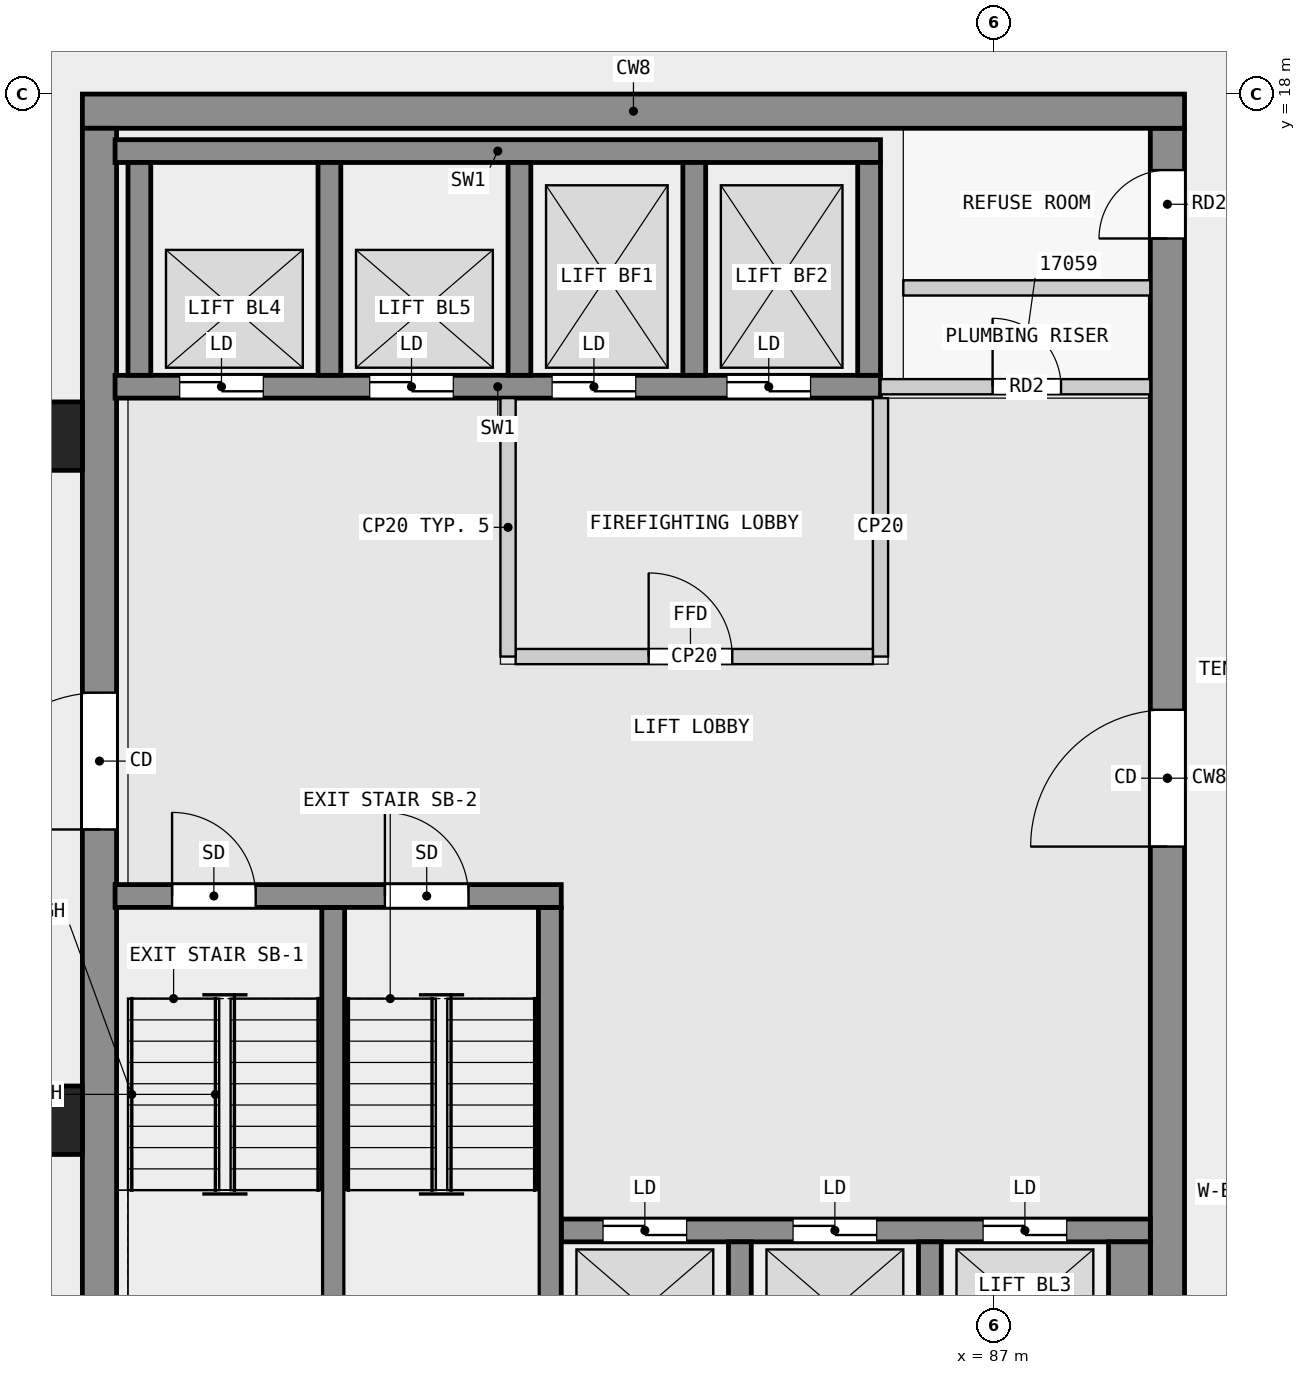
"""IFC4 building model, lengths in metres.
Left out: names, types, materials, properties, quantities, classifications, styles, units other than length and angle.
Written with IfcOpenShell. Run it as: python <this file> out.ifc"""

import sys

from ifc_helpers import new_model, si_unit, direction, frame, frame_2d, origin, origin_2d, place, context, subcontext, project, spatial, rectangle, extrude, element, fill, save


model = new_model("IFC4")
c1 = context("Model", 3, precision=1e-05, world=origin(), true_north=direction((0.0, 1.0)))
c2 = subcontext(c1, "Body", "Model", "MODEL_VIEW")
j1 = project(units=[si_unit("LENGTHUNIT", "METRE"), si_unit("PLANEANGLEUNIT", "RADIAN")], contexts=[c1])
p1 = place(None, origin())
s1 = spatial("IfcSite", under=j1, at=p1, CompositionType="ELEMENT")
p2 = place(p1, origin())
s2 = spatial("IfcBuilding", under=s1, at=p2, CompositionType="ELEMENT")
p3 = place(p2, frame((0.0, 0.0, 68.8)))
s3 = spatial("IfcBuildingStorey", under=s2, at=p3, CompositionType="ELEMENT", Elevation=68.8)
for number, where, z_axis, x_axis in (
    (1, (74.55, 13.5, 0.0), (0.0, 0.0, 1.0), (1.0, 0.0, 0.0)),
    (2, (74.55, 4.5, 0.0), (0.0, 0.0, 1.0), (1.0, 0.0, 0.0)),
):
    element("IfcColumn", number, at=place(p3, frame(where, z_axis=z_axis, x_axis=x_axis)), inside=s3, PredefinedType="COLUMN", context=c2, shape_type="SweptSolid", body=[
        extrude(rectangle(XDim=0.9, YDim=0.9, at=origin_2d()), origin(), (0.0, 0.0, 1.0), 3.5),
    ])
p4 = place(p3, frame((75.0, 17.775, 0.0), z_axis=(0.0, 0.0, 1.0), x_axis=(1.0, 0.0, 0.0)))
e3 = element("IfcWall", 3, at=p4, inside=s3, PredefinedType="SHEAR", context=c2, shape_type="SweptSolid", body=[
    extrude(rectangle(XDim=14.5, YDim=0.45, at=frame_2d((7.25, 0.0))), origin(), (0.0, 0.0, 1.0), 3.2),
])
p5 = place(p3, frame((75.225, 0.45, 0.0), z_axis=(0.0, 0.0, 1.0), x_axis=(0.0, 1.0, 0.0)))
e4 = element("IfcWall", 4, at=p5, inside=s3, PredefinedType="SHEAR", context=c2, shape_type="SweptSolid", body=[
    extrude(rectangle(XDim=17.1, YDim=0.45, at=frame_2d((8.55, 0.0))), origin(), (0.0, 0.0, 1.0), 3.2),
])
p6 = place(p5, frame((7.875, 0.0, 0.0)))
e5 = element("IfcOpeningElement", 5, at=p6, cuts=e4, PredefinedType="OPENING", context=c2, shape_type="SweptSolid", body=[
    extrude(rectangle(XDim=1.8, YDim=2.1, at=frame_2d((0.9, 1.05))), frame((0.0, 0.235, 0.0), z_axis=(0.0, -1.0, 0.0), x_axis=(1.0, 0.0, 0.0)), (0.0, 0.0, 1.0), 0.47),
])
p7 = place(p3, frame((89.275, 0.45, 0.0), z_axis=(0.0, 0.0, 1.0), x_axis=(0.0, 1.0, 0.0)))
e6 = element("IfcWall", 6, at=p7, inside=s3, PredefinedType="SHEAR", context=c2, shape_type="SweptSolid", body=[
    extrude(rectangle(XDim=17.1, YDim=0.45, at=frame_2d((8.55, 0.0))), origin(), (0.0, 0.0, 1.0), 3.2),
])
p8 = place(p7, frame((7.65, 0.0, 0.0)))
e7 = element("IfcOpeningElement", 7, at=p8, cuts=e6, PredefinedType="OPENING", context=c2, shape_type="SweptSolid", body=[
    extrude(rectangle(XDim=1.8, YDim=2.1, at=frame_2d((0.9, 1.05))), frame((0.0, 0.235, 0.0), z_axis=(0.0, -1.0, 0.0), x_axis=(1.0, 0.0, 0.0)), (0.0, 0.0, 1.0), 0.47),
])
p9 = place(p7, frame((15.65, 0.0, 0.0)))
e8 = element("IfcOpeningElement", 8, at=p9, cuts=e6, PredefinedType="OPENING", context=c2, shape_type="SweptSolid", body=[
    extrude(rectangle(XDim=0.9, YDim=2.1, at=frame_2d((0.45, 1.05))), frame((0.0, 0.235, 0.0), z_axis=(0.0, -1.0, 0.0), x_axis=(1.0, 0.0, 0.0)), (0.0, 0.0, 1.0), 0.47),
])
p10 = place(p3, frame((75.43, 7.45, 0.0), z_axis=(0.0, 0.0, 1.0), x_axis=(1.0, 0.0, 0.0)))
e9 = element("IfcWall", 9, at=p10, inside=s3, PredefinedType="SHEAR", context=c2, shape_type="SweptSolid", body=[
    extrude(rectangle(XDim=5.87, YDim=0.3, at=frame_2d((2.935, 0.0))), origin(), (0.0, 0.0, 1.0), 3.2),
])
p11 = place(p10, frame((0.75, 0.0, 0.0)))
e10 = element("IfcOpeningElement", 10, at=p11, cuts=e9, PredefinedType="OPENING", context=c2, shape_type="SweptSolid", body=[
    extrude(rectangle(XDim=1.1, YDim=2.1, at=frame_2d((0.55, 1.05))), frame((0.0, 0.16, 0.0), z_axis=(0.0, -1.0, 0.0), x_axis=(1.0, 0.0, 0.0)), (0.0, 0.0, 1.0), 0.32),
])
p12 = place(p10, frame((3.55, 0.0, 0.0)))
e11 = element("IfcOpeningElement", 11, at=p12, cuts=e9, PredefinedType="OPENING", context=c2, shape_type="SweptSolid", body=[
    extrude(rectangle(XDim=1.1, YDim=2.1, at=frame_2d((0.55, 1.05))), frame((0.0, 0.16, 0.0), z_axis=(0.0, -1.0, 0.0), x_axis=(1.0, 0.0, 0.0)), (0.0, 0.0, 1.0), 0.32),
])
for number, where, z_axis, x_axis in (
    (12, (78.3, 0.9, 0.0), (0.0, 0.0, 1.0), (0.0, 1.0, 0.0)),
    (13, (81.15, 0.9, 0.0), (0.0, 0.0, 1.0), (0.0, 1.0, 0.0)),
):
    element("IfcWall", number, at=place(p3, frame(where, z_axis=z_axis, x_axis=x_axis)), inside=s3, PredefinedType="SHEAR", context=c2, shape_type="SweptSolid", body=[
        extrude(rectangle(XDim=6.4, YDim=0.3, at=frame_2d((3.2, 0.0))), origin(), (0.0, 0.0, 1.0), 3.2),
    ])
for number, where, z_axis, x_axis in (
    (14, (83.65, 0.9, 0.0), (0.0, 0.0, 1.0), (0.0, 1.0, 0.0)),
    (15, (86.15, 0.9, 0.0), (0.0, 0.0, 1.0), (0.0, 1.0, 0.0)),
):
    element("IfcWall", number, at=place(p3, frame(where, z_axis=z_axis, x_axis=x_axis)), inside=s3, PredefinedType="SHEAR", context=c2, shape_type="SweptSolid", body=[
        extrude(rectangle(XDim=2.0, YDim=0.3, at=frame_2d((1.0, 0.0))), origin(), (0.0, 0.0, 1.0), 3.2),
    ])
p13 = place(p3, frame((88.775, 0.9, 0.0), z_axis=(0.0, 0.0, 1.0), x_axis=(0.0, 1.0, 0.0)))
e16 = element("IfcWall", 16, at=p13, inside=s3, PredefinedType="SHEAR", context=c2, shape_type="SweptSolid", body=[
    extrude(rectangle(XDim=2.0, YDim=0.55, at=frame_2d((1.0, 0.0))), origin(), (0.0, 0.0, 1.0), 3.2),
])
p14 = place(p3, frame((81.3, 3.05, 0.0), z_axis=(0.0, 0.0, 1.0), x_axis=(1.0, 0.0, 0.0)))
e17 = element("IfcWall", 17, at=p14, inside=s3, PredefinedType="SHEAR", context=c2, shape_type="SweptSolid", body=[
    extrude(rectangle(XDim=7.75, YDim=0.3, at=frame_2d((3.875, 0.0))), origin(), (0.0, 0.0, 1.0), 3.2),
])
p15 = place(p14, frame((0.55, 0.0, 0.0)))
e18 = element("IfcOpeningElement", 18, at=p15, cuts=e17, PredefinedType="OPENING", context=c2, shape_type="SweptSolid", body=[
    extrude(rectangle(XDim=1.1, YDim=2.1, at=frame_2d((0.55, 1.05))), frame((0.0, 0.16, 0.0), z_axis=(0.0, -1.0, 0.0), x_axis=(1.0, 0.0, 0.0)), (0.0, 0.0, 1.0), 0.32),
])
p16 = place(p14, frame((3.05, 0.0, 0.0)))
e19 = element("IfcOpeningElement", 19, at=p16, cuts=e17, PredefinedType="OPENING", context=c2, shape_type="SweptSolid", body=[
    extrude(rectangle(XDim=1.1, YDim=2.1, at=frame_2d((0.55, 1.05))), frame((0.0, 0.16, 0.0), z_axis=(0.0, -1.0, 0.0), x_axis=(1.0, 0.0, 0.0)), (0.0, 0.0, 1.0), 0.32),
])
p17 = place(p14, frame((5.55, 0.0, 0.0)))
e20 = element("IfcOpeningElement", 20, at=p17, cuts=e17, PredefinedType="OPENING", context=c2, shape_type="SweptSolid", body=[
    extrude(rectangle(XDim=1.1, YDim=2.1, at=frame_2d((0.55, 1.05))), frame((0.0, 0.16, 0.0), z_axis=(0.0, -1.0, 0.0), x_axis=(1.0, 0.0, 0.0)), (0.0, 0.0, 1.0), 0.32),
])
p18 = place(p3, frame((75.43, 17.25, 0.0), z_axis=(0.0, 0.0, 1.0), x_axis=(1.0, 0.0, 0.0)))
e21 = element("IfcWall", 21, at=p18, inside=s3, PredefinedType="SHEAR", context=c2, shape_type="SweptSolid", body=[
    extrude(rectangle(XDim=10.07, YDim=0.3, at=frame_2d((5.035, 0.0))), origin(), (0.0, 0.0, 1.0), 3.2),
])
p19 = place(p3, frame((75.43, 14.15, 0.0), z_axis=(0.0, 0.0, 1.0), x_axis=(1.0, 0.0, 0.0)))
e22 = element("IfcWall", 22, at=p19, inside=s3, PredefinedType="SHEAR", context=c2, shape_type="SweptSolid", body=[
    extrude(rectangle(XDim=10.07, YDim=0.3, at=frame_2d((5.035, 0.0))), origin(), (0.0, 0.0, 1.0), 3.2),
])
p20 = place(p19, frame((0.85, 0.0, 0.0)))
e23 = element("IfcOpeningElement", 23, at=p20, cuts=e22, PredefinedType="OPENING", context=c2, shape_type="SweptSolid", body=[
    extrude(rectangle(XDim=1.1, YDim=2.1, at=frame_2d((0.55, 1.05))), frame((0.0, 0.16, 0.0), z_axis=(0.0, -1.0, 0.0), x_axis=(1.0, 0.0, 0.0)), (0.0, 0.0, 1.0), 0.32),
])
p21 = place(p19, frame((3.35, 0.0, 0.0)))
e24 = element("IfcOpeningElement", 24, at=p21, cuts=e22, PredefinedType="OPENING", context=c2, shape_type="SweptSolid", body=[
    extrude(rectangle(XDim=1.1, YDim=2.1, at=frame_2d((0.55, 1.05))), frame((0.0, 0.16, 0.0), z_axis=(0.0, -1.0, 0.0), x_axis=(1.0, 0.0, 0.0)), (0.0, 0.0, 1.0), 0.32),
])
p22 = place(p19, frame((5.75, 0.0, 0.0)))
e25 = element("IfcOpeningElement", 25, at=p22, cuts=e22, PredefinedType="OPENING", context=c2, shape_type="SweptSolid", body=[
    extrude(rectangle(XDim=1.1, YDim=2.1, at=frame_2d((0.55, 1.05))), frame((0.0, 0.16, 0.0), z_axis=(0.0, -1.0, 0.0), x_axis=(1.0, 0.0, 0.0)), (0.0, 0.0, 1.0), 0.32),
])
p23 = place(p19, frame((8.05, 0.0, 0.0)))
e26 = element("IfcOpeningElement", 26, at=p23, cuts=e22, PredefinedType="OPENING", context=c2, shape_type="SweptSolid", body=[
    extrude(rectangle(XDim=1.1, YDim=2.1, at=frame_2d((0.55, 1.05))), frame((0.0, 0.16, 0.0), z_axis=(0.0, -1.0, 0.0), x_axis=(1.0, 0.0, 0.0)), (0.0, 0.0, 1.0), 0.32),
])
for number, where, z_axis, x_axis in (
    (27, (75.75, 14.3, 0.0), (0.0, 0.0, 1.0), (0.0, 1.0, 0.0)),
    (28, (78.25, 14.3, 0.0), (0.0, 0.0, 1.0), (0.0, 1.0, 0.0)),
    (29, (80.75, 14.3, 0.0), (0.0, 0.0, 1.0), (0.0, 1.0, 0.0)),
    (30, (83.05, 14.3, 0.0), (0.0, 0.0, 1.0), (0.0, 1.0, 0.0)),
    (31, (85.35, 14.3, 0.0), (0.0, 0.0, 1.0), (0.0, 1.0, 0.0)),
):
    element("IfcWall", number, at=place(p3, frame(where, z_axis=z_axis, x_axis=x_axis)), inside=s3, PredefinedType="SHEAR", context=c2, shape_type="SweptSolid", body=[
        extrude(rectangle(XDim=2.8, YDim=0.3, at=frame_2d((1.4, 0.0))), origin(), (0.0, 0.0, 1.0), 3.2),
    ])
p24 = place(p3, frame((80.6, 10.6, 0.0), z_axis=(0.0, 0.0, 1.0), x_axis=(0.0, 1.0, 0.0)))
e32 = element("IfcWall", 32, at=p24, inside=s3, PredefinedType="PARTITIONING", context=c2, shape_type="SweptSolid", body=[
    extrude(rectangle(XDim=3.4, YDim=0.2, at=frame_2d((1.7, 0.0))), origin(), (0.0, 0.0, 1.0), 3.2),
])
p25 = place(p3, frame((80.7, 10.6, 0.0), z_axis=(0.0, 0.0, 1.0), x_axis=(1.0, 0.0, 0.0)))
e33 = element("IfcWall", 33, at=p25, inside=s3, PredefinedType="PARTITIONING", context=c2, shape_type="SweptSolid", body=[
    extrude(rectangle(XDim=4.7, YDim=0.2, at=frame_2d((2.35, 0.0))), origin(), (0.0, 0.0, 1.0), 3.2),
])
p26 = place(p25, frame((1.75, 0.0, 0.0)))
e34 = element("IfcOpeningElement", 34, at=p26, cuts=e33, PredefinedType="OPENING", context=c2, shape_type="SweptSolid", body=[
    extrude(rectangle(XDim=1.1, YDim=2.1, at=frame_2d((0.55, 1.05))), frame((0.0, 0.11, 0.0), z_axis=(0.0, -1.0, 0.0), x_axis=(1.0, 0.0, 0.0)), (0.0, 0.0, 1.0), 0.22),
])
p27 = place(p3, frame((85.5, 10.6, 0.0), z_axis=(0.0, 0.0, 1.0), x_axis=(0.0, 1.0, 0.0)))
e35 = element("IfcWall", 35, at=p27, inside=s3, PredefinedType="PARTITIONING", context=c2, shape_type="SweptSolid", body=[
    extrude(rectangle(XDim=3.4, YDim=0.2, at=frame_2d((1.7, 0.0))), origin(), (0.0, 0.0, 1.0), 3.2),
])
p28 = place(p3, frame((85.5, 14.15, 0.0), z_axis=(0.0, 0.0, 1.0), x_axis=(1.0, 0.0, 0.0)))
e36 = element("IfcWall", 36, at=p28, inside=s3, PredefinedType="PARTITIONING", context=c2, shape_type="SweptSolid", body=[
    extrude(rectangle(XDim=3.55, YDim=0.2, at=frame_2d((1.775, 0.0))), origin(), (0.0, 0.0, 1.0), 3.2),
])
p29 = place(p28, frame((1.475, 0.0, 0.0)))
e37 = element("IfcOpeningElement", 37, at=p29, cuts=e36, PredefinedType="OPENING", context=c2, shape_type="SweptSolid", body=[
    extrude(rectangle(XDim=0.9, YDim=2.1, at=frame_2d((0.45, 1.05))), frame((0.0, 0.11, 0.0), z_axis=(0.0, -1.0, 0.0), x_axis=(1.0, 0.0, 0.0)), (0.0, 0.0, 1.0), 0.22),
])
p30 = place(p3, frame((85.8, 15.45, 0.0), z_axis=(0.0, 0.0, 1.0), x_axis=(1.0, 0.0, 0.0)))
e38 = element("IfcWall", 38, at=p30, inside=s3, PredefinedType="PARTITIONING", context=c2, shape_type="SweptSolid", body=[
    extrude(rectangle(XDim=3.25, YDim=0.2, at=frame_2d((1.625, 0.0))), origin(), (0.0, 0.0, 1.0), 3.2),
])
p31 = place(p26, origin())
e39 = element("IfcDoor", 39, at=p31, inside=s3, OperationType="SINGLE_SWING_LEFT", PredefinedType="DOOR", context=c2, shape_type="SweptSolid", body=[
    extrude(rectangle(XDim=1.1, YDim=2.1, at=frame_2d((0.55, 1.05))), frame((0.0, 0.025, 0.0), z_axis=(0.0, -1.0, 0.0), x_axis=(1.0, 0.0, 0.0)), (0.0, 0.0, 1.0), 0.05),
])
fill(e34, e39)
p32 = place(p15, origin())
e40 = element("IfcDoor", 40, at=p32, inside=s3, OperationType="DOUBLE_DOOR_SLIDING", PredefinedType="DOOR", context=c2, shape_type="SweptSolid", body=[
    extrude(rectangle(XDim=1.1, YDim=2.1, at=frame_2d((0.55, 1.05))), frame((0.0, 0.025, 0.0), z_axis=(0.0, -1.0, 0.0), x_axis=(1.0, 0.0, 0.0)), (0.0, 0.0, 1.0), 0.05),
])
fill(e18, e40)
p33 = place(p16, origin())
e41 = element("IfcDoor", 41, at=p33, inside=s3, OperationType="DOUBLE_DOOR_SLIDING", PredefinedType="DOOR", context=c2, shape_type="SweptSolid", body=[
    extrude(rectangle(XDim=1.1, YDim=2.1, at=frame_2d((0.55, 1.05))), frame((0.0, 0.025, 0.0), z_axis=(0.0, -1.0, 0.0), x_axis=(1.0, 0.0, 0.0)), (0.0, 0.0, 1.0), 0.05),
])
fill(e19, e41)
p34 = place(p17, origin())
e42 = element("IfcDoor", 42, at=p34, inside=s3, OperationType="DOUBLE_DOOR_SLIDING", PredefinedType="DOOR", context=c2, shape_type="SweptSolid", body=[
    extrude(rectangle(XDim=1.1, YDim=2.1, at=frame_2d((0.55, 1.05))), frame((0.0, 0.025, 0.0), z_axis=(0.0, -1.0, 0.0), x_axis=(1.0, 0.0, 0.0)), (0.0, 0.0, 1.0), 0.05),
])
fill(e20, e42)
p35 = place(p20, origin())
e43 = element("IfcDoor", 43, at=p35, inside=s3, OperationType="DOUBLE_DOOR_SLIDING", PredefinedType="DOOR", context=c2, shape_type="SweptSolid", body=[
    extrude(rectangle(XDim=1.1, YDim=2.1, at=frame_2d((0.55, 1.05))), frame((0.0, 0.025, 0.0), z_axis=(0.0, -1.0, 0.0), x_axis=(1.0, 0.0, 0.0)), (0.0, 0.0, 1.0), 0.05),
])
fill(e23, e43)
p36 = place(p21, origin())
e44 = element("IfcDoor", 44, at=p36, inside=s3, OperationType="DOUBLE_DOOR_SLIDING", PredefinedType="DOOR", context=c2, shape_type="SweptSolid", body=[
    extrude(rectangle(XDim=1.1, YDim=2.1, at=frame_2d((0.55, 1.05))), frame((0.0, 0.025, 0.0), z_axis=(0.0, -1.0, 0.0), x_axis=(1.0, 0.0, 0.0)), (0.0, 0.0, 1.0), 0.05),
])
fill(e24, e44)
p37 = place(p22, origin())
e45 = element("IfcDoor", 45, at=p37, inside=s3, OperationType="DOUBLE_DOOR_SLIDING", PredefinedType="DOOR", context=c2, shape_type="SweptSolid", body=[
    extrude(rectangle(XDim=1.1, YDim=2.1, at=frame_2d((0.55, 1.05))), frame((0.0, 0.025, 0.0), z_axis=(0.0, -1.0, 0.0), x_axis=(1.0, 0.0, 0.0)), (0.0, 0.0, 1.0), 0.05),
])
fill(e25, e45)
p38 = place(p23, origin())
e46 = element("IfcDoor", 46, at=p38, inside=s3, OperationType="DOUBLE_DOOR_SLIDING", PredefinedType="DOOR", context=c2, shape_type="SweptSolid", body=[
    extrude(rectangle(XDim=1.1, YDim=2.1, at=frame_2d((0.55, 1.05))), frame((0.0, 0.025, 0.0), z_axis=(0.0, -1.0, 0.0), x_axis=(1.0, 0.0, 0.0)), (0.0, 0.0, 1.0), 0.05),
])
fill(e26, e46)
p39 = place(p11, origin())
e47 = element("IfcDoor", 47, at=p39, inside=s3, OperationType="SINGLE_SWING_RIGHT", PredefinedType="DOOR", context=c2, shape_type="SweptSolid", body=[
    extrude(rectangle(XDim=1.1, YDim=2.1, at=frame_2d((0.55, 1.05))), frame((0.0, 0.025, 0.0), z_axis=(0.0, -1.0, 0.0), x_axis=(1.0, 0.0, 0.0)), (0.0, 0.0, 1.0), 0.05),
])
fill(e10, e47)
p40 = place(p12, origin())
e48 = element("IfcDoor", 48, at=p40, inside=s3, OperationType="SINGLE_SWING_LEFT", PredefinedType="DOOR", context=c2, shape_type="SweptSolid", body=[
    extrude(rectangle(XDim=1.1, YDim=2.1, at=frame_2d((0.55, 1.05))), frame((0.0, 0.025, 0.0), z_axis=(0.0, -1.0, 0.0), x_axis=(1.0, 0.0, 0.0)), (0.0, 0.0, 1.0), 0.05),
])
fill(e11, e48)
p41 = place(p6, origin())
e49 = element("IfcDoor", 49, at=p41, inside=s3, OperationType="DOUBLE_DOOR_SINGLE_SWING", PredefinedType="DOOR", context=c2, shape_type="SweptSolid", body=[
    extrude(rectangle(XDim=1.8, YDim=2.1, at=frame_2d((0.9, 1.05))), frame((0.0, 0.025, 0.0), z_axis=(0.0, -1.0, 0.0), x_axis=(1.0, 0.0, 0.0)), (0.0, 0.0, 1.0), 0.05),
])
fill(e5, e49)
p42 = place(p8, origin())
e50 = element("IfcDoor", 50, at=p42, inside=s3, OperationType="DOUBLE_DOOR_SINGLE_SWING", PredefinedType="DOOR", context=c2, shape_type="SweptSolid", body=[
    extrude(rectangle(XDim=1.8, YDim=2.1, at=frame_2d((0.9, 1.05))), frame((0.0, 0.025, 0.0), z_axis=(0.0, -1.0, 0.0), x_axis=(1.0, 0.0, 0.0)), (0.0, 0.0, 1.0), 0.05),
])
fill(e7, e50)
p43 = place(p29, origin())
e51 = element("IfcDoor", 51, at=p43, inside=s3, OperationType="SINGLE_SWING_LEFT", PredefinedType="DOOR", context=c2, shape_type="SweptSolid", body=[
    extrude(rectangle(XDim=0.9, YDim=2.1, at=frame_2d((0.45, 1.05))), frame((0.0, 0.025, 0.0), z_axis=(0.0, -1.0, 0.0), x_axis=(1.0, 0.0, 0.0)), (0.0, 0.0, 1.0), 0.05),
])
fill(e37, e51)
p44 = place(p9, origin())
e52 = element("IfcDoor", 52, at=p44, inside=s3, OperationType="SINGLE_SWING_LEFT", PredefinedType="DOOR", context=c2, shape_type="SweptSolid", body=[
    extrude(rectangle(XDim=0.9, YDim=2.1, at=frame_2d((0.45, 1.05))), frame((0.0, 0.025, 0.0), z_axis=(0.0, -1.0, 0.0), x_axis=(1.0, 0.0, 0.0)), (0.0, 0.0, 1.0), 0.05),
])
fill(e8, e52)
save(model, sys.argv[1])
